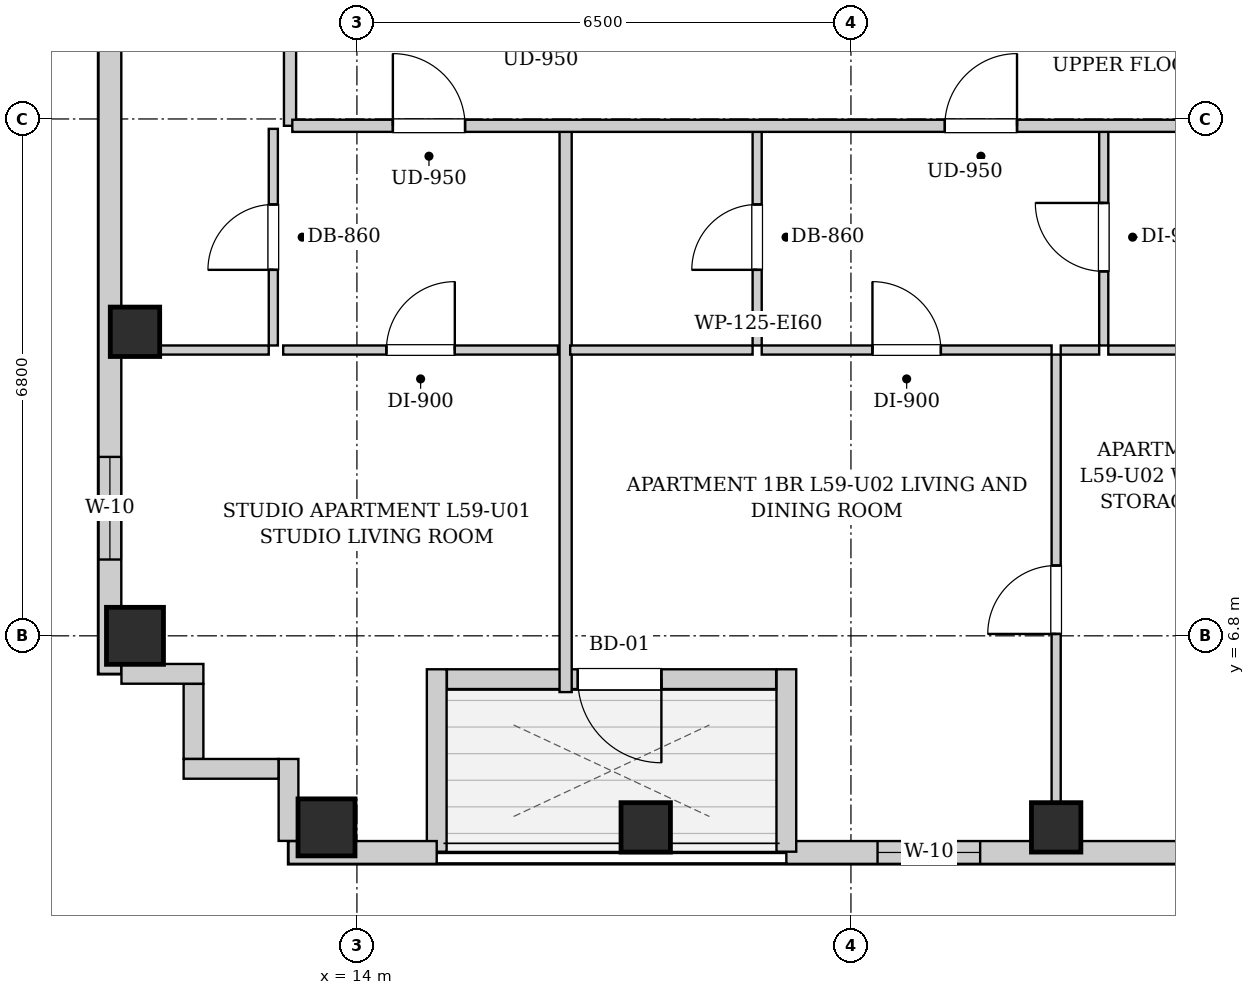
"""IFC4 building model, lengths in metres.
Left out: names, types, materials, properties, quantities, classifications, styles, units other than length and angle.
Written with IfcOpenShell. Run it as: python <this file> out.ifc"""

import sys

from ifc_helpers import new_model, si_unit, direction, frame, frame_2d, origin, origin_2d, place, context, subcontext, project, spatial, rectangle, extrude, element, fill, save


model = new_model("IFC4")
c1 = context("Model", 3, precision=1e-05, world=origin(), true_north=direction((0.0, 1.0)))
c2 = subcontext(c1, "Body", "Model", "MODEL_VIEW")
j1 = project(units=[si_unit("LENGTHUNIT", "METRE"), si_unit("PLANEANGLEUNIT", "RADIAN")], contexts=[c1])
p1 = place(None, origin())
s1 = spatial("IfcSite", under=j1, at=p1, CompositionType="ELEMENT")
p2 = place(p1, origin())
s2 = spatial("IfcBuilding", under=s1, at=p2, CompositionType="ELEMENT")
p3 = place(p2, frame((0.0, 0.0, 204.1)))
s3 = spatial("IfcBuildingStorey", under=s2, at=p3, CompositionType="ELEMENT", Elevation=204.1)
p4 = place(p3, frame((13.6, 4.28, 0.0), z_axis=(0.0, 0.0, 1.0), x_axis=(1.0, 0.0, 0.0)))
e1 = element("IfcColumn", 1, at=p4, inside=s3, PredefinedType="COLUMN", context=c2, shape_type="SweptSolid", body=[
    extrude(rectangle(XDim=0.75, YDim=0.75, at=origin_2d()), origin(), (0.0, 0.0, 1.0), 3.3),
])
for number, where, z_axis, x_axis in (
    (2, (17.8, 4.28, 0.0), (0.0, 0.0, 1.0), (1.0, 0.0, 0.0)),
    (3, (23.2, 4.28, 0.0), (0.0, 0.0, 1.0), (1.0, 0.0, 0.0)),
):
    element("IfcColumn", number, at=place(p3, frame(where, z_axis=z_axis, x_axis=x_axis)), inside=s3, PredefinedType="COLUMN", context=c2, shape_type="SweptSolid", body=[
        extrude(rectangle(XDim=0.65, YDim=0.65, at=origin_2d()), origin(), (0.0, 0.0, 1.0), 3.3),
    ])
p5 = place(p3, frame((11.08, 6.8, 0.0), z_axis=(0.0, 0.0, 1.0), x_axis=(1.0, 0.0, 0.0)))
e4 = element("IfcColumn", 4, at=p5, inside=s3, PredefinedType="COLUMN", context=c2, shape_type="SweptSolid", body=[
    extrude(rectangle(XDim=0.75, YDim=0.75, at=origin_2d()), origin(), (0.0, 0.0, 1.0), 3.3),
])
p6 = place(p3, frame((11.08, 10.8, 0.0), z_axis=(0.0, 0.0, 1.0), x_axis=(1.0, 0.0, 0.0)))
e5 = element("IfcColumn", 5, at=p6, inside=s3, PredefinedType="COLUMN", context=c2, shape_type="SweptSolid", body=[
    extrude(rectangle(XDim=0.65, YDim=0.65, at=origin_2d()), origin(), (0.0, 0.0, 1.0), 3.3),
])
p7 = place(p3, frame((37.8, 3.95, 0.0), z_axis=(0.0, 0.0, 1.0), x_axis=(-1.0, 0.0, 0.0)))
e6 = element("IfcWall", 6, at=p7, inside=s3, PredefinedType="SOLIDWALL", context=c2, shape_type="SweptSolid", body=[
    extrude(rectangle(XDim=18.15, YDim=0.3, at=frame_2d((9.075, 0.0))), origin(), (0.0, 0.0, 1.0), 3.04),
])
p8 = place(p7, frame((15.6, 0.0, 0.55)))
e7 = element("IfcOpeningElement", 7, at=p8, cuts=e6, PredefinedType="OPENING", context=c2, shape_type="SweptSolid", body=[
    extrude(rectangle(XDim=1.35, YDim=1.2, at=frame_2d((0.675, 0.6))), frame((0.0, 0.16, 0.0), z_axis=(0.0, -1.0, 0.0), x_axis=(1.0, 0.0, 0.0)), (0.0, 0.0, 1.0), 0.32),
])
p9 = place(p7, frame((8.1, 0.0, 0.55)))
e8 = element("IfcOpeningElement", 8, at=p9, cuts=e6, PredefinedType="OPENING", context=c2, shape_type="SweptSolid", body=[
    extrude(rectangle(XDim=1.35, YDim=1.2, at=frame_2d((0.675, 0.6))), frame((0.0, 0.16, 0.0), z_axis=(0.0, -1.0, 0.0), x_axis=(1.0, 0.0, 0.0)), (0.0, 0.0, 1.0), 0.32),
])
p10 = place(p7, frame((2.7, 0.0, 0.55)))
e9 = element("IfcOpeningElement", 9, at=p10, cuts=e6, PredefinedType="OPENING", context=c2, shape_type="SweptSolid", body=[
    extrude(rectangle(XDim=1.35, YDim=1.2, at=frame_2d((0.675, 0.6))), frame((0.0, 0.16, 0.0), z_axis=(0.0, -1.0, 0.0), x_axis=(1.0, 0.0, 0.0)), (0.0, 0.0, 1.0), 0.32),
])
p11 = place(p7, frame((1.035, 0.0, 0.55)))
e10 = element("IfcOpeningElement", 10, at=p11, cuts=e6, PredefinedType="OPENING", context=c2, shape_type="SweptSolid", body=[
    extrude(rectangle(XDim=1.35, YDim=1.2, at=frame_2d((0.675, 0.6))), frame((0.0, 0.16, 0.0), z_axis=(0.0, -1.0, 0.0), x_axis=(1.0, 0.0, 0.0)), (0.0, 0.0, 1.0), 0.32),
])
p12 = place(p3, frame((19.65, 3.96, 0.0), z_axis=(0.0, 0.0, 1.0), x_axis=(0.0, 1.0, 0.0)))
e11 = element("IfcWall", 11, at=p12, inside=s3, PredefinedType="SOLIDWALL", context=c2, shape_type="SweptSolid", body=[
    extrude(rectangle(XDim=2.4, YDim=0.26, at=frame_2d((1.2, 0.0))), origin(), (0.0, 0.0, 1.0), 3.04),
])
p13 = place(p3, frame((19.516, 6.23, 0.0), z_axis=(0.0, 0.0, 1.0), x_axis=(-1.0, 0.0, 0.0)))
e12 = element("IfcWall", 12, at=p13, inside=s3, PredefinedType="SOLIDWALL", context=c2, shape_type="SweptSolid", body=[
    extrude(rectangle(XDim=4.332, YDim=0.26, at=frame_2d((2.166, 0.0))), origin(), (0.0, 0.0, 1.0), 3.04),
])
p14 = place(p13, frame((1.51, 0.0, 0.0)))
e13 = element("IfcOpeningElement", 13, at=p14, cuts=e12, PredefinedType="OPENING", context=c2, shape_type="SweptSolid", body=[
    extrude(rectangle(XDim=1.1, YDim=2.0, at=frame_2d((0.55, 1.0))), frame((0.0, 0.14, 0.0), z_axis=(0.0, -1.0, 0.0), x_axis=(1.0, 0.0, 0.0)), (0.0, 0.0, 1.0), 0.28),
])
p15 = place(p3, frame((15.05, 6.36, 0.0), z_axis=(0.0, 0.0, 1.0), x_axis=(0.0, -1.0, 0.0)))
e14 = element("IfcWall", 14, at=p15, inside=s3, PredefinedType="SOLIDWALL", context=c2, shape_type="SweptSolid", body=[
    extrude(rectangle(XDim=2.4, YDim=0.26, at=frame_2d((1.2, 0.0))), origin(), (0.0, 0.0, 1.0), 3.04),
])
p16 = place(p3, frame((15.05, 3.95, 0.0), z_axis=(0.0, 0.0, 1.0), x_axis=(-1.0, 0.0, 0.0)))
e15 = element("IfcWall", 15, at=p16, inside=s3, PredefinedType="SOLIDWALL", context=c2, shape_type="SweptSolid", body=[
    extrude(rectangle(XDim=1.95, YDim=0.3, at=frame_2d((0.975, 0.0))), origin(), (0.0, 0.0, 1.0), 3.04),
])
p17 = place(p3, frame((10.75, 6.3, 0.0), z_axis=(0.0, 0.0, 1.0), x_axis=(0.0, 1.0, 0.0)))
e16 = element("IfcWall", 16, at=p17, inside=s3, PredefinedType="SOLIDWALL", context=c2, shape_type="SweptSolid", body=[
    extrude(rectangle(XDim=31.4, YDim=0.3, at=frame_2d((15.7, 0.0))), origin(), (0.0, 0.0, 1.0), 3.04),
])
p18 = place(p17, frame((1.504, 0.0, 0.55)))
e17 = element("IfcOpeningElement", 17, at=p18, cuts=e16, PredefinedType="OPENING", context=c2, shape_type="SweptSolid", body=[
    extrude(rectangle(XDim=1.35, YDim=1.2, at=frame_2d((0.675, 0.6))), frame((0.0, 0.16, 0.0), z_axis=(0.0, -1.0, 0.0), x_axis=(1.0, 0.0, 0.0)), (0.0, 0.0, 1.0), 0.32),
])
p19 = place(p17, frame((28.546, 0.0, 0.55)))
e18 = element("IfcOpeningElement", 18, at=p19, cuts=e16, PredefinedType="OPENING", context=c2, shape_type="SweptSolid", body=[
    extrude(rectangle(XDim=1.35, YDim=1.2, at=frame_2d((0.675, 0.6))), frame((0.0, 0.16, 0.0), z_axis=(0.0, -1.0, 0.0), x_axis=(1.0, 0.0, 0.0)), (0.0, 0.0, 1.0), 0.32),
])
p20 = place(p17, frame((11.85, 0.0, 0.55)))
e19 = element("IfcOpeningElement", 19, at=p20, cuts=e16, PredefinedType="OPENING", context=c2, shape_type="SweptSolid", body=[
    extrude(rectangle(XDim=1.35, YDim=1.2, at=frame_2d((0.675, 0.6))), frame((0.0, 0.16, 0.0), z_axis=(0.0, -1.0, 0.0), x_axis=(1.0, 0.0, 0.0)), (0.0, 0.0, 1.0), 0.32),
])
p21 = place(p17, frame((9.185, 0.0, 0.55)))
e20 = element("IfcOpeningElement", 20, at=p21, cuts=e16, PredefinedType="OPENING", context=c2, shape_type="SweptSolid", body=[
    extrude(rectangle(XDim=1.35, YDim=1.2, at=frame_2d((0.675, 0.6))), frame((0.0, 0.16, 0.0), z_axis=(0.0, -1.0, 0.0), x_axis=(1.0, 0.0, 0.0)), (0.0, 0.0, 1.0), 0.32),
])
p22 = place(p17, frame((19.006, 0.0, 0.55)))
e21 = element("IfcOpeningElement", 21, at=p22, cuts=e16, PredefinedType="OPENING", context=c2, shape_type="SweptSolid", body=[
    extrude(rectangle(XDim=1.35, YDim=1.2, at=frame_2d((0.675, 0.6))), frame((0.0, 0.16, 0.0), z_axis=(0.0, -1.0, 0.0), x_axis=(1.0, 0.0, 0.0)), (0.0, 0.0, 1.0), 0.32),
])
p23 = place(p17, frame((20.616, 0.0, 0.55)))
e22 = element("IfcOpeningElement", 22, at=p23, cuts=e16, PredefinedType="OPENING", context=c2, shape_type="SweptSolid", body=[
    extrude(rectangle(XDim=1.35, YDim=1.2, at=frame_2d((0.675, 0.6))), frame((0.0, 0.16, 0.0), z_axis=(0.0, -1.0, 0.0), x_axis=(1.0, 0.0, 0.0)), (0.0, 0.0, 1.0), 0.32),
])
p24 = place(p3, frame((13.1, 4.102, 0.0), z_axis=(0.0, 0.0, 1.0), x_axis=(0.0, 1.0, 0.0)))
e23 = element("IfcWall", 23, at=p24, inside=s3, PredefinedType="SOLIDWALL", context=c2, shape_type="SweptSolid", body=[
    extrude(rectangle(XDim=1.078, YDim=0.26, at=frame_2d((0.539, 0.0))), origin(), (0.0, 0.0, 1.0), 3.04),
])
p25 = place(p3, frame((12.968, 5.05, 0.0), z_axis=(0.0, 0.0, 1.0), x_axis=(-1.0, 0.0, 0.0)))
e24 = element("IfcWall", 24, at=p25, inside=s3, PredefinedType="SOLIDWALL", context=c2, shape_type="SweptSolid", body=[
    extrude(rectangle(XDim=1.248, YDim=0.26, at=frame_2d((0.624, 0.0))), origin(), (0.0, 0.0, 1.0), 3.04),
])
p26 = place(p3, frame((11.85, 5.182, 0.0), z_axis=(0.0, 0.0, 1.0), x_axis=(0.0, 1.0, 0.0)))
e25 = element("IfcWall", 25, at=p26, inside=s3, PredefinedType="SOLIDWALL", context=c2, shape_type="SweptSolid", body=[
    extrude(rectangle(XDim=0.986, YDim=0.26, at=frame_2d((0.493, 0.0))), origin(), (0.0, 0.0, 1.0), 3.04),
])
p27 = place(p3, frame((11.98, 6.3, 0.0), z_axis=(0.0, 0.0, 1.0), x_axis=(-1.0, 0.0, 0.0)))
e26 = element("IfcWall", 26, at=p27, inside=s3, PredefinedType="SOLIDWALL", context=c2, shape_type="SweptSolid", body=[
    extrude(rectangle(XDim=1.078, YDim=0.26, at=frame_2d((0.539, 0.0))), origin(), (0.0, 0.0, 1.0), 3.04),
])
p28 = place(p3, frame((13.12, 13.51, 0.0), z_axis=(0.0, 0.0, 1.0), x_axis=(0.0, 1.0, 0.0)))
e27 = element("IfcWall", 27, at=p28, inside=s3, PredefinedType="PARTITIONING", context=c2, shape_type="SweptSolid", body=[
    extrude(rectangle(XDim=1.58, YDim=0.16, at=frame_2d((0.79, 0.0))), origin(), (0.0, 0.0, 1.0), 3.04),
])
p29 = place(p3, frame((12.9, 10.62, 0.0), z_axis=(0.0, 0.0, 1.0), x_axis=(0.0, 1.0, 0.0)))
e28 = element("IfcWall", 28, at=p29, inside=s3, PredefinedType="PARTITIONING", context=c2, shape_type="SweptSolid", body=[
    extrude(rectangle(XDim=2.85, YDim=0.12, at=frame_2d((1.425, 0.0))), origin(), (0.0, 0.0, 1.0), 3.04),
])
p30 = place(p29, frame((0.995, 0.0, 0.0)))
e29 = element("IfcOpeningElement", 29, at=p30, cuts=e28, PredefinedType="OPENING", context=c2, shape_type="SweptSolid", body=[
    extrude(rectangle(XDim=0.86, YDim=2.05, at=frame_2d((0.43, 1.025))), frame((0.0, 0.07, 0.0), z_axis=(0.0, -1.0, 0.0), x_axis=(1.0, 0.0, 0.0)), (0.0, 0.0, 1.0), 0.14),
])
p31 = place(p3, frame((10.99, 10.56, 0.0), z_axis=(0.0, 0.0, 1.0), x_axis=(1.0, 0.0, 0.0)))
e30 = element("IfcWall", 30, at=p31, inside=s3, PredefinedType="PARTITIONING", context=c2, shape_type="SweptSolid", body=[
    extrude(rectangle(XDim=1.85, YDim=0.12, at=frame_2d((0.925, 0.0))), origin(), (0.0, 0.0, 1.0), 3.04),
])
p32 = place(p3, frame((13.03, 10.56, 0.0), z_axis=(0.0, 0.0, 1.0), x_axis=(1.0, 0.0, 0.0)))
e31 = element("IfcWall", 31, at=p32, inside=s3, PredefinedType="PARTITIONING", context=c2, shape_type="SweptSolid", body=[
    extrude(rectangle(XDim=3.616, YDim=0.12, at=frame_2d((1.808, 0.0))), origin(), (0.0, 0.0, 1.0), 3.04),
])
p33 = place(p32, frame((1.358, 0.0, 0.0)))
e32 = element("IfcOpeningElement", 32, at=p33, cuts=e31, PredefinedType="OPENING", context=c2, shape_type="SweptSolid", body=[
    extrude(rectangle(XDim=0.9, YDim=2.05, at=frame_2d((0.45, 1.025))), frame((0.0, 0.07, 0.0), z_axis=(0.0, -1.0, 0.0), x_axis=(1.0, 0.0, 0.0)), (0.0, 0.0, 1.0), 0.14),
])
p34 = place(p3, frame((16.746, 6.06, 0.0), z_axis=(0.0, 0.0, 1.0), x_axis=(0.0, 1.0, 0.0)))
e33 = element("IfcWall", 33, at=p34, inside=s3, PredefinedType="PARTITIONING", context=c2, shape_type="SweptSolid", body=[
    extrude(rectangle(XDim=7.41, YDim=0.16, at=frame_2d((3.705, 0.0))), origin(), (0.0, 0.0, 1.0), 3.04),
])
p35 = place(p3, frame((19.266, 10.62, 0.0), z_axis=(0.0, 0.0, 1.0), x_axis=(0.0, 1.0, 0.0)))
e34 = element("IfcWall", 34, at=p35, inside=s3, PredefinedType="PARTITIONING", context=c2, shape_type="SweptSolid", body=[
    extrude(rectangle(XDim=2.85, YDim=0.12, at=frame_2d((1.425, 0.0))), origin(), (0.0, 0.0, 1.0), 3.04),
])
p36 = place(p35, frame((0.995, 0.0, 0.0)))
e35 = element("IfcOpeningElement", 35, at=p36, cuts=e34, PredefinedType="OPENING", context=c2, shape_type="SweptSolid", body=[
    extrude(rectangle(XDim=0.86, YDim=2.05, at=frame_2d((0.43, 1.025))), frame((0.0, 0.07, 0.0), z_axis=(0.0, -1.0, 0.0), x_axis=(1.0, 0.0, 0.0)), (0.0, 0.0, 1.0), 0.14),
])
p37 = place(p3, frame((16.806, 10.56, 0.0), z_axis=(0.0, 0.0, 1.0), x_axis=(1.0, 0.0, 0.0)))
e36 = element("IfcWall", 36, at=p37, inside=s3, PredefinedType="PARTITIONING", context=c2, shape_type="SweptSolid", body=[
    extrude(rectangle(XDim=2.4, YDim=0.12, at=frame_2d((1.2, 0.0))), origin(), (0.0, 0.0, 1.0), 3.04),
])
p38 = place(p3, frame((23.826, 10.62, 0.0), z_axis=(0.0, 0.0, 1.0), x_axis=(0.0, 1.0, 0.0)))
e37 = element("IfcWall", 37, at=p38, inside=s3, PredefinedType="PARTITIONING", context=c2, shape_type="SweptSolid", body=[
    extrude(rectangle(XDim=2.85, YDim=0.12, at=frame_2d((1.425, 0.0))), origin(), (0.0, 0.0, 1.0), 3.04),
])
p39 = place(p38, frame((0.975, 0.0, 0.0)))
e38 = element("IfcOpeningElement", 38, at=p39, cuts=e37, PredefinedType="OPENING", context=c2, shape_type="SweptSolid", body=[
    extrude(rectangle(XDim=0.9, YDim=2.05, at=frame_2d((0.45, 1.025))), frame((0.0, 0.07, 0.0), z_axis=(0.0, -1.0, 0.0), x_axis=(1.0, 0.0, 0.0)), (0.0, 0.0, 1.0), 0.14),
])
p40 = place(p3, frame((19.326, 10.56, 0.0), z_axis=(0.0, 0.0, 1.0), x_axis=(1.0, 0.0, 0.0)))
e39 = element("IfcWall", 39, at=p40, inside=s3, PredefinedType="PARTITIONING", context=c2, shape_type="SweptSolid", body=[
    extrude(rectangle(XDim=3.814, YDim=0.12, at=frame_2d((1.907, 0.0))), origin(), (0.0, 0.0, 1.0), 3.04),
])
p41 = place(p40, frame((1.457, 0.0, 0.0)))
e40 = element("IfcOpeningElement", 40, at=p41, cuts=e39, PredefinedType="OPENING", context=c2, shape_type="SweptSolid", body=[
    extrude(rectangle(XDim=0.9, YDim=2.05, at=frame_2d((0.45, 1.025))), frame((0.0, 0.07, 0.0), z_axis=(0.0, -1.0, 0.0), x_axis=(1.0, 0.0, 0.0)), (0.0, 0.0, 1.0), 0.14),
])
p42 = place(p3, frame((23.26, 10.56, 0.0), z_axis=(0.0, 0.0, 1.0), x_axis=(1.0, 0.0, 0.0)))
e41 = element("IfcWall", 41, at=p42, inside=s3, PredefinedType="PARTITIONING", context=c2, shape_type="SweptSolid", body=[
    extrude(rectangle(XDim=0.506, YDim=0.12, at=frame_2d((0.253, 0.0))), origin(), (0.0, 0.0, 1.0), 3.04),
])
p43 = place(p3, frame((23.886, 10.56, 0.0), z_axis=(0.0, 0.0, 1.0), x_axis=(1.0, 0.0, 0.0)))
e42 = element("IfcWall", 42, at=p43, inside=s3, PredefinedType="PARTITIONING", context=c2, shape_type="SweptSolid", body=[
    extrude(rectangle(XDim=2.854, YDim=0.12, at=frame_2d((1.427, 0.0))), origin(), (0.0, 0.0, 1.0), 3.04),
])
p44 = place(p43, frame((0.977, 0.0, 0.0)))
e43 = element("IfcOpeningElement", 43, at=p44, cuts=e42, PredefinedType="OPENING", context=c2, shape_type="SweptSolid", body=[
    extrude(rectangle(XDim=0.9, YDim=2.05, at=frame_2d((0.45, 1.025))), frame((0.0, 0.07, 0.0), z_axis=(0.0, -1.0, 0.0), x_axis=(1.0, 0.0, 0.0)), (0.0, 0.0, 1.0), 0.14),
])
p45 = place(p3, frame((23.2, 4.08, 0.0), z_axis=(0.0, 0.0, 1.0), x_axis=(0.0, 1.0, 0.0)))
e44 = element("IfcWall", 44, at=p45, inside=s3, PredefinedType="PARTITIONING", context=c2, shape_type="SweptSolid", body=[
    extrude(rectangle(XDim=6.42, YDim=0.12, at=frame_2d((3.21, 0.0))), origin(), (0.0, 0.0, 1.0), 3.04),
])
p46 = place(p45, frame((2.745, 0.0, 0.0)))
e45 = element("IfcOpeningElement", 45, at=p46, cuts=e44, PredefinedType="OPENING", context=c2, shape_type="SweptSolid", body=[
    extrude(rectangle(XDim=0.9, YDim=2.05, at=frame_2d((0.45, 1.025))), frame((0.0, 0.07, 0.0), z_axis=(0.0, -1.0, 0.0), x_axis=(1.0, 0.0, 0.0)), (0.0, 0.0, 1.0), 0.14),
])
p47 = place(p3, frame((13.15, 13.51, 0.0), z_axis=(0.0, 0.0, 1.0), x_axis=(1.0, 0.0, 0.0)))
e46 = element("IfcWall", 46, at=p47, inside=s3, PredefinedType="PARTITIONING", context=c2, shape_type="SweptSolid", body=[
    extrude(rectangle(XDim=24.6, YDim=0.16, at=frame_2d((12.3, 0.0))), origin(), (0.0, 0.0, 1.0), 3.04),
])
p48 = place(p47, frame((1.323, 0.0, 0.0)))
e47 = element("IfcOpeningElement", 47, at=p48, cuts=e46, PredefinedType="OPENING", context=c2, shape_type="SweptSolid", body=[
    extrude(rectangle(XDim=0.95, YDim=2.1, at=frame_2d((0.475, 1.05))), frame((0.0, 0.09, 0.0), z_axis=(0.0, -1.0, 0.0), x_axis=(1.0, 0.0, 0.0)), (0.0, 0.0, 1.0), 0.18),
])
p49 = place(p47, frame((8.585, 0.0, 0.0)))
e48 = element("IfcOpeningElement", 48, at=p49, cuts=e46, PredefinedType="OPENING", context=c2, shape_type="SweptSolid", body=[
    extrude(rectangle(XDim=0.95, YDim=2.1, at=frame_2d((0.475, 1.05))), frame((0.0, 0.09, 0.0), z_axis=(0.0, -1.0, 0.0), x_axis=(1.0, 0.0, 0.0)), (0.0, 0.0, 1.0), 0.18),
])
p50 = place(p47, frame((21.889, 0.0, 0.0)))
e49 = element("IfcOpeningElement", 49, at=p50, cuts=e46, PredefinedType="OPENING", context=c2, shape_type="SweptSolid", body=[
    extrude(rectangle(XDim=0.95, YDim=2.1, at=frame_2d((0.475, 1.05))), frame((0.0, 0.09, 0.0), z_axis=(0.0, -1.0, 0.0), x_axis=(1.0, 0.0, 0.0)), (0.0, 0.0, 1.0), 0.18),
])
p51 = place(p30, origin())
e50 = element("IfcDoor", 50, at=p51, inside=s3, OperationType="SINGLE_SWING_LEFT", PredefinedType="DOOR", context=c2, shape_type="SweptSolid", body=[
    extrude(rectangle(XDim=0.86, YDim=2.05, at=frame_2d((0.43, 1.025))), frame((0.0, 0.025, 0.0), z_axis=(0.0, -1.0, 0.0), x_axis=(1.0, 0.0, 0.0)), (0.0, 0.0, 1.0), 0.05),
])
fill(e29, e50)
p52 = place(p33, origin())
e51 = element("IfcDoor", 51, at=p52, inside=s3, OperationType="SINGLE_SWING_RIGHT", PredefinedType="DOOR", context=c2, shape_type="SweptSolid", body=[
    extrude(rectangle(XDim=0.9, YDim=2.05, at=frame_2d((0.45, 1.025))), frame((0.0, 0.025, 0.0), z_axis=(0.0, -1.0, 0.0), x_axis=(1.0, 0.0, 0.0)), (0.0, 0.0, 1.0), 0.05),
])
fill(e32, e51)
p53 = place(p36, origin())
e52 = element("IfcDoor", 52, at=p53, inside=s3, OperationType="SINGLE_SWING_LEFT", PredefinedType="DOOR", context=c2, shape_type="SweptSolid", body=[
    extrude(rectangle(XDim=0.86, YDim=2.05, at=frame_2d((0.43, 1.025))), frame((0.0, 0.025, 0.0), z_axis=(0.0, -1.0, 0.0), x_axis=(1.0, 0.0, 0.0)), (0.0, 0.0, 1.0), 0.05),
])
fill(e35, e52)
p54 = place(p39, origin())
e53 = element("IfcDoor", 53, at=p54, inside=s3, OperationType="SINGLE_SWING_RIGHT", PredefinedType="DOOR", context=c2, shape_type="SweptSolid", body=[
    extrude(rectangle(XDim=0.9, YDim=2.05, at=frame_2d((0.45, 1.025))), frame((0.0, 0.025, 0.0), z_axis=(0.0, -1.0, 0.0), x_axis=(1.0, 0.0, 0.0)), (0.0, 0.0, 1.0), 0.05),
])
fill(e38, e53)
p55 = place(p41, origin())
e54 = element("IfcDoor", 54, at=p55, inside=s3, OperationType="SINGLE_SWING_LEFT", PredefinedType="DOOR", context=c2, shape_type="SweptSolid", body=[
    extrude(rectangle(XDim=0.9, YDim=2.05, at=frame_2d((0.45, 1.025))), frame((0.0, 0.025, 0.0), z_axis=(0.0, -1.0, 0.0), x_axis=(1.0, 0.0, 0.0)), (0.0, 0.0, 1.0), 0.05),
])
fill(e40, e54)
p56 = place(p46, origin())
e55 = element("IfcDoor", 55, at=p56, inside=s3, OperationType="SINGLE_SWING_LEFT", PredefinedType="DOOR", context=c2, shape_type="SweptSolid", body=[
    extrude(rectangle(XDim=0.9, YDim=2.05, at=frame_2d((0.45, 1.025))), frame((0.0, 0.025, 0.0), z_axis=(0.0, -1.0, 0.0), x_axis=(1.0, 0.0, 0.0)), (0.0, 0.0, 1.0), 0.05),
])
fill(e45, e55)
p57 = place(p48, origin())
e56 = element("IfcDoor", 56, at=p57, inside=s3, OperationType="SINGLE_SWING_LEFT", PredefinedType="DOOR", context=c2, shape_type="SweptSolid", body=[
    extrude(rectangle(XDim=0.95, YDim=2.1, at=frame_2d((0.475, 1.05))), frame((0.0, 0.025, 0.0), z_axis=(0.0, -1.0, 0.0), x_axis=(1.0, 0.0, 0.0)), (0.0, 0.0, 1.0), 0.05),
])
fill(e47, e56)
p58 = place(p49, origin())
e57 = element("IfcDoor", 57, at=p58, inside=s3, OperationType="SINGLE_SWING_RIGHT", PredefinedType="DOOR", context=c2, shape_type="SweptSolid", body=[
    extrude(rectangle(XDim=0.95, YDim=2.1, at=frame_2d((0.475, 1.05))), frame((0.0, 0.025, 0.0), z_axis=(0.0, -1.0, 0.0), x_axis=(1.0, 0.0, 0.0)), (0.0, 0.0, 1.0), 0.05),
])
fill(e48, e57)
p59 = place(p14, origin())
e58 = element("IfcDoor", 58, at=p59, inside=s3, OperationType="SINGLE_SWING_LEFT", PredefinedType="DOOR", context=c2, shape_type="SweptSolid", body=[
    extrude(rectangle(XDim=1.1, YDim=2.0, at=frame_2d((0.55, 1.0))), frame((0.0, 0.025, 0.0), z_axis=(0.0, -1.0, 0.0), x_axis=(1.0, 0.0, 0.0)), (0.0, 0.0, 1.0), 0.05),
])
fill(e13, e58)
p60 = place(p18, origin())
e59 = element("IfcWindow", 59, at=p60, inside=s3, PartitioningType="SINGLE_PANEL", PredefinedType="WINDOW", context=c2, shape_type="SweptSolid", body=[
    extrude(rectangle(XDim=1.35, YDim=1.2, at=frame_2d((0.675, 0.6))), frame((0.0, 0.03, 0.0), z_axis=(0.0, -1.0, 0.0), x_axis=(1.0, 0.0, 0.0)), (0.0, 0.0, 1.0), 0.06),
])
fill(e17, e59)
p61 = place(p8, origin())
e60 = element("IfcWindow", 60, at=p61, inside=s3, PartitioningType="SINGLE_PANEL", PredefinedType="WINDOW", context=c2, shape_type="SweptSolid", body=[
    extrude(rectangle(XDim=1.35, YDim=1.2, at=frame_2d((0.675, 0.6))), frame((0.0, 0.03, 0.0), z_axis=(0.0, -1.0, 0.0), x_axis=(1.0, 0.0, 0.0)), (0.0, 0.0, 1.0), 0.06),
])
fill(e7, e60)
save(model, sys.argv[1])
